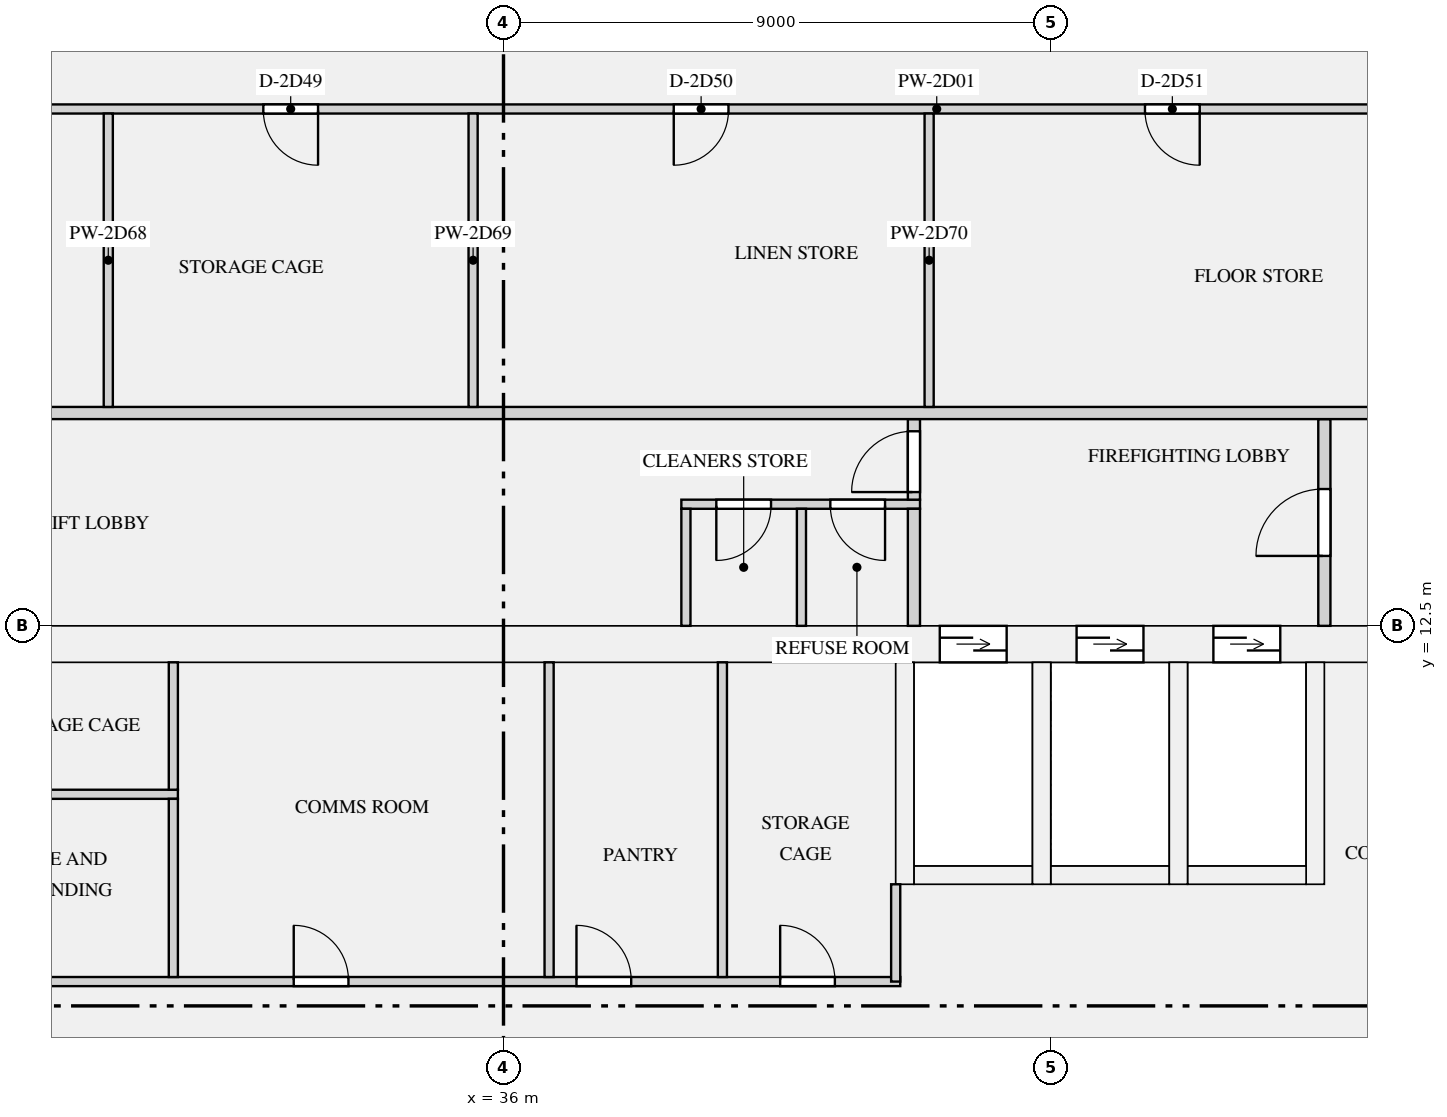
"""IFC4 building model, lengths in metres.
Left out: names, types, materials, properties, quantities, classifications, styles, units other than length and angle.
Written with IfcOpenShell. Run it as: python <this file> out.ifc"""

import sys

from ifc_helpers import new_model, si_unit, direction, frame, frame_2d, origin, place, context, subcontext, project, spatial, rectangle, extrude, element, fill, save


model = new_model("IFC4")
c1 = context("Model", 3, precision=1e-05, world=origin(), true_north=direction((0.0, 1.0)))
c2 = subcontext(c1, "Body", "Model", "MODEL_VIEW")
j1 = project(units=[si_unit("LENGTHUNIT", "METRE"), si_unit("PLANEANGLEUNIT", "RADIAN")], contexts=[c1])
p1 = place(None, origin())
s1 = spatial("IfcSite", under=j1, at=p1, CompositionType="ELEMENT")
p2 = place(p1, origin())
s2 = spatial("IfcBuilding", under=s1, at=p2, CompositionType="ELEMENT")
p3 = place(p2, frame((0.0, 0.0, 111.9)))
s3 = spatial("IfcBuildingStorey", under=s2, at=p3, CompositionType="ELEMENT", Elevation=111.9)
p4 = place(p3, frame((18.8, 12.2, 0.0), z_axis=(0.0, 0.0, 1.0), x_axis=(1.0, 0.0, 0.0)))
e1 = element("IfcWall", 1, at=p4, inside=s3, PredefinedType="SHEAR", context=c2, shape_type="SweptSolid", body=[
    extrude(rectangle(XDim=34.4, YDim=0.6, at=frame_2d((17.2, 0.0))), origin(), (0.0, 0.0, 1.0), 3.15),
])
p5 = place(p4, frame((24.375, 0.0, 0.0)))
e2 = element("IfcOpeningElement", 2, at=p5, cuts=e1, PredefinedType="OPENING", context=c2, shape_type="SweptSolid", body=[
    extrude(rectangle(XDim=1.1, YDim=2.1, at=frame_2d((0.55, 1.05))), frame((0.0, 0.31, 0.0), z_axis=(0.0, -1.0, 0.0), x_axis=(1.0, 0.0, 0.0)), (0.0, 0.0, 1.0), 0.62),
])
p6 = place(p4, frame((26.625, 0.0, 0.0)))
e3 = element("IfcOpeningElement", 3, at=p6, cuts=e1, PredefinedType="OPENING", context=c2, shape_type="SweptSolid", body=[
    extrude(rectangle(XDim=1.1, YDim=2.1, at=frame_2d((0.55, 1.05))), frame((0.0, 0.31, 0.0), z_axis=(0.0, -1.0, 0.0), x_axis=(1.0, 0.0, 0.0)), (0.0, 0.0, 1.0), 0.62),
])
p7 = place(p4, frame((28.875, 0.0, 0.0)))
e4 = element("IfcOpeningElement", 4, at=p7, cuts=e1, PredefinedType="OPENING", context=c2, shape_type="SweptSolid", body=[
    extrude(rectangle(XDim=1.1, YDim=2.1, at=frame_2d((0.55, 1.05))), frame((0.0, 0.31, 0.0), z_axis=(0.0, -1.0, 0.0), x_axis=(1.0, 0.0, 0.0)), (0.0, 0.0, 1.0), 0.62),
])
p8 = place(p4, frame((8.75, 0.0, 0.0)))
e5 = element("IfcOpeningElement", 5, at=p8, cuts=e1, PredefinedType="OPENING", context=c2, shape_type="SweptSolid", body=[
    extrude(rectangle(XDim=0.9, YDim=2.1, at=frame_2d((0.45, 1.05))), frame((0.0, 0.31, 0.0), z_axis=(0.0, -1.0, 0.0), x_axis=(1.0, 0.0, 0.0)), (0.0, 0.0, 1.0), 0.62),
])
p9 = place(p4, frame((1.35, 0.0, 0.0)))
e6 = element("IfcOpeningElement", 6, at=p9, cuts=e1, PredefinedType="OPENING", context=c2, shape_type="SweptSolid", body=[
    extrude(rectangle(XDim=1.2, YDim=2.1, at=frame_2d((0.6, 1.05))), frame((0.0, 0.31, 0.0), z_axis=(0.0, -1.0, 0.0), x_axis=(1.0, 0.0, 0.0)), (0.0, 0.0, 1.0), 0.62),
])
p10 = place(p4, frame((31.85, 0.0, 0.0)))
e7 = element("IfcOpeningElement", 7, at=p10, cuts=e1, PredefinedType="OPENING", context=c2, shape_type="SweptSolid", body=[
    extrude(rectangle(XDim=1.2, YDim=2.1, at=frame_2d((0.6, 1.05))), frame((0.0, 0.31, 0.0), z_axis=(0.0, -1.0, 0.0), x_axis=(1.0, 0.0, 0.0)), (0.0, 0.0, 1.0), 0.62),
])
p11 = place(p3, frame((42.75, 8.4, 0.0), z_axis=(0.0, 0.0, 1.0), x_axis=(1.0, 0.0, 0.0)))
e8 = element("IfcWall", 8, at=p11, inside=s3, PredefinedType="SHEAR", context=c2, shape_type="SweptSolid", body=[
    extrude(rectangle(XDim=1.95, YDim=0.3, at=frame_2d((0.975, 0.0))), origin(), (0.0, 0.0, 1.0), 3.15),
])
p12 = place(p3, frame((42.6, 8.25, 0.0), z_axis=(0.0, 0.0, 1.0), x_axis=(0.0, 1.0, 0.0)))
e9 = element("IfcWall", 9, at=p12, inside=s3, PredefinedType="SHEAR", context=c2, shape_type="SweptSolid", body=[
    extrude(rectangle(XDim=3.65, YDim=0.3, at=frame_2d((1.825, 0.0))), origin(), (0.0, 0.0, 1.0), 3.15),
])
p13 = place(p3, frame((45.0, 8.4, 0.0), z_axis=(0.0, 0.0, 1.0), x_axis=(1.0, 0.0, 0.0)))
e10 = element("IfcWall", 10, at=p13, inside=s3, PredefinedType="SHEAR", context=c2, shape_type="SweptSolid", body=[
    extrude(rectangle(XDim=1.95, YDim=0.3, at=frame_2d((0.975, 0.0))), origin(), (0.0, 0.0, 1.0), 3.15),
])
p14 = place(p3, frame((44.85, 8.25, 0.0), z_axis=(0.0, 0.0, 1.0), x_axis=(0.0, 1.0, 0.0)))
e11 = element("IfcWall", 11, at=p14, inside=s3, PredefinedType="SHEAR", context=c2, shape_type="SweptSolid", body=[
    extrude(rectangle(XDim=3.65, YDim=0.3, at=frame_2d((1.825, 0.0))), origin(), (0.0, 0.0, 1.0), 3.15),
])
p15 = place(p3, frame((47.25, 8.4, 0.0), z_axis=(0.0, 0.0, 1.0), x_axis=(1.0, 0.0, 0.0)))
e12 = element("IfcWall", 12, at=p15, inside=s3, PredefinedType="SHEAR", context=c2, shape_type="SweptSolid", body=[
    extrude(rectangle(XDim=1.95, YDim=0.3, at=frame_2d((0.975, 0.0))), origin(), (0.0, 0.0, 1.0), 3.15),
])
for number, where, z_axis, x_axis in (
    (13, (47.1, 8.25, 0.0), (0.0, 0.0, 1.0), (0.0, 1.0, 0.0)),
    (14, (49.35, 8.25, 0.0), (0.0, 0.0, 1.0), (0.0, 1.0, 0.0)),
):
    element("IfcWall", number, at=place(p3, frame(where, z_axis=z_axis, x_axis=x_axis)), inside=s3, PredefinedType="SHEAR", context=c2, shape_type="SweptSolid", body=[
        extrude(rectangle(XDim=3.65, YDim=0.3, at=frame_2d((1.825, 0.0))), origin(), (0.0, 0.0, 1.0), 3.15),
    ])
p16 = place(p3, frame((22.725, 6.65, 0.0), z_axis=(0.0, 0.0, 1.0), x_axis=(1.0, 0.0, 0.0)))
e15 = element("IfcWall", 15, at=p16, inside=s3, PredefinedType="PARTITIONING", context=c2, shape_type="SweptSolid", body=[
    extrude(rectangle(XDim=19.8, YDim=0.15, at=frame_2d((9.9, 0.0))), origin(), (0.0, 0.0, 1.0), 2.83),
])
p17 = place(p16, frame((0.825, 0.0, 0.0)))
e16 = element("IfcOpeningElement", 16, at=p17, cuts=e15, PredefinedType="OPENING", context=c2, shape_type="SweptSolid", body=[
    extrude(rectangle(XDim=0.9, YDim=2.1, at=frame_2d((0.45, 1.05))), frame((0.0, 0.085, 0.0), z_axis=(0.0, -1.0, 0.0), x_axis=(1.0, 0.0, 0.0)), (0.0, 0.0, 1.0), 0.17),
])
p18 = place(p16, frame((4.825, 0.0, 0.0)))
e17 = element("IfcOpeningElement", 17, at=p18, cuts=e15, PredefinedType="OPENING", context=c2, shape_type="SweptSolid", body=[
    extrude(rectangle(XDim=0.9, YDim=2.1, at=frame_2d((0.45, 1.05))), frame((0.0, 0.085, 0.0), z_axis=(0.0, -1.0, 0.0), x_axis=(1.0, 0.0, 0.0)), (0.0, 0.0, 1.0), 0.17),
])
p19 = place(p16, frame((9.825, 0.0, 0.0)))
e18 = element("IfcOpeningElement", 18, at=p19, cuts=e15, PredefinedType="OPENING", context=c2, shape_type="SweptSolid", body=[
    extrude(rectangle(XDim=0.9, YDim=2.1, at=frame_2d((0.45, 1.05))), frame((0.0, 0.085, 0.0), z_axis=(0.0, -1.0, 0.0), x_axis=(1.0, 0.0, 0.0)), (0.0, 0.0, 1.0), 0.17),
])
p20 = place(p16, frame((14.475, 0.0, 0.0)))
e19 = element("IfcOpeningElement", 19, at=p20, cuts=e15, PredefinedType="OPENING", context=c2, shape_type="SweptSolid", body=[
    extrude(rectangle(XDim=0.9, YDim=2.1, at=frame_2d((0.45, 1.05))), frame((0.0, 0.085, 0.0), z_axis=(0.0, -1.0, 0.0), x_axis=(1.0, 0.0, 0.0)), (0.0, 0.0, 1.0), 0.17),
])
p21 = place(p16, frame((17.825, 0.0, 0.0)))
e20 = element("IfcOpeningElement", 20, at=p21, cuts=e15, PredefinedType="OPENING", context=c2, shape_type="SweptSolid", body=[
    extrude(rectangle(XDim=0.9, YDim=2.1, at=frame_2d((0.45, 1.05))), frame((0.0, 0.085, 0.0), z_axis=(0.0, -1.0, 0.0), x_axis=(1.0, 0.0, 0.0)), (0.0, 0.0, 1.0), 0.17),
])
p22 = place(p3, frame((25.855, 9.73, 0.0), z_axis=(0.0, 0.0, 1.0), x_axis=(1.0, 0.0, 0.0)))
e21 = element("IfcWall", 21, at=p22, inside=s3, PredefinedType="PARTITIONING", context=c2, shape_type="SweptSolid", body=[
    extrude(rectangle(XDim=4.79, YDim=0.15, at=frame_2d((2.395, 0.0))), origin(), (0.0, 0.0, 1.0), 2.83),
])
p23 = place(p3, frame((38.925, 14.5, 0.0), z_axis=(0.0, 0.0, 1.0), x_axis=(1.0, 0.0, 0.0)))
e22 = element("IfcWall", 22, at=p23, inside=s3, PredefinedType="PARTITIONING", context=c2, shape_type="SweptSolid", body=[
    extrude(rectangle(XDim=3.925, YDim=0.15, at=frame_2d((1.962, 0.0))), origin(), (0.0, 0.0, 1.0), 2.83),
])
p24 = place(p23, frame((0.575, 0.0, 0.0)))
e23 = element("IfcOpeningElement", 23, at=p24, cuts=e22, PredefinedType="OPENING", context=c2, shape_type="SweptSolid", body=[
    extrude(rectangle(XDim=0.9, YDim=2.1, at=frame_2d((0.45, 1.05))), frame((0.0, 0.085, 0.0), z_axis=(0.0, -1.0, 0.0), x_axis=(1.0, 0.0, 0.0)), (0.0, 0.0, 1.0), 0.17),
])
p25 = place(p23, frame((2.45, 0.0, 0.0)))
e24 = element("IfcOpeningElement", 24, at=p25, cuts=e22, PredefinedType="OPENING", context=c2, shape_type="SweptSolid", body=[
    extrude(rectangle(XDim=0.9, YDim=2.1, at=frame_2d((0.45, 1.05))), frame((0.0, 0.085, 0.0), z_axis=(0.0, -1.0, 0.0), x_axis=(1.0, 0.0, 0.0)), (0.0, 0.0, 1.0), 0.17),
])
p26 = place(p3, frame((42.45, 6.65, 0.0), z_axis=(0.0, 0.0, 1.0), x_axis=(0.0, 1.0, 0.0)))
e25 = element("IfcWall", 25, at=p26, inside=s3, PredefinedType="PARTITIONING", context=c2, shape_type="SweptSolid", body=[
    extrude(rectangle(XDim=1.6, YDim=0.15, at=frame_2d((0.8, 0.0))), origin(), (0.0, 0.0, 1.0), 2.83),
])
p27 = place(p3, frame((30.57, 6.725, 0.0), z_axis=(0.0, 0.0, 1.0), x_axis=(0.0, 1.0, 0.0)))
e26 = element("IfcWall", 26, at=p27, inside=s3, PredefinedType="PARTITIONING", context=c2, shape_type="SweptSolid", body=[
    extrude(rectangle(XDim=2.93, YDim=0.15, at=frame_2d((1.465, 0.0))), origin(), (0.0, 0.0, 1.0), 2.83),
])
for number, where, z_axis, x_axis in (
    (27, (36.75, 6.725, 0.0), (0.0, 0.0, 1.0), (0.0, 1.0, 0.0)),
    (28, (39.6, 6.725, 0.0), (0.0, 0.0, 1.0), (0.0, 1.0, 0.0)),
):
    element("IfcWall", number, at=place(p3, frame(where, z_axis=z_axis, x_axis=x_axis)), inside=s3, PredefinedType="PARTITIONING", context=c2, shape_type="SweptSolid", body=[
        extrude(rectangle(XDim=5.175, YDim=0.15, at=frame_2d((2.587, 0.0))), origin(), (0.0, 0.0, 1.0), 2.83),
    ])
p28 = place(p3, frame((30.57, 9.805, 0.0), z_axis=(0.0, 0.0, 1.0), x_axis=(0.0, 1.0, 0.0)))
e29 = element("IfcWall", 29, at=p28, inside=s3, PredefinedType="PARTITIONING", context=c2, shape_type="SweptSolid", body=[
    extrude(rectangle(XDim=2.095, YDim=0.15, at=frame_2d((1.047, 0.0))), origin(), (0.0, 0.0, 1.0), 2.83),
])
for number, where, z_axis, x_axis in (
    (30, (39.0, 12.5, 0.0), (0.0, 0.0, 1.0), (0.0, 1.0, 0.0)),
    (31, (40.9, 12.5, 0.0), (0.0, 0.0, 1.0), (0.0, 1.0, 0.0)),
):
    element("IfcWall", number, at=place(p3, frame(where, z_axis=z_axis, x_axis=x_axis)), inside=s3, PredefinedType="PARTITIONING", context=c2, shape_type="SweptSolid", body=[
        extrude(rectangle(XDim=1.925, YDim=0.15, at=frame_2d((0.962, 0.0))), origin(), (0.0, 0.0, 1.0), 2.83),
    ])
p29 = place(p3, frame((42.75, 12.5, 0.0), z_axis=(0.0, 0.0, 1.0), x_axis=(0.0, 1.0, 0.0)))
e32 = element("IfcWall", 32, at=p29, inside=s3, PredefinedType="PARTITIONING", context=c2, shape_type="SweptSolid", body=[
    extrude(rectangle(XDim=1.925, YDim=0.2, at=frame_2d((0.962, 0.0))), origin(), (0.0, 0.0, 1.0), 2.83),
])
p30 = place(p3, frame((49.5, 12.5, 0.0), z_axis=(0.0, 0.0, 1.0), x_axis=(0.0, 1.0, 0.0)))
e33 = element("IfcWall", 33, at=p30, inside=s3, PredefinedType="PARTITIONING", context=c2, shape_type="SweptSolid", body=[
    extrude(rectangle(XDim=3.4, YDim=0.2, at=frame_2d((1.7, 0.0))), origin(), (0.0, 0.0, 1.0), 2.83),
])
p31 = place(p30, frame((1.15, 0.0, 0.0)))
e34 = element("IfcOpeningElement", 34, at=p31, cuts=e33, PredefinedType="OPENING", context=c2, shape_type="SweptSolid", body=[
    extrude(rectangle(XDim=1.1, YDim=2.1, at=frame_2d((0.55, 1.05))), frame((0.0, 0.11, 0.0), z_axis=(0.0, -1.0, 0.0), x_axis=(1.0, 0.0, 0.0)), (0.0, 0.0, 1.0), 0.22),
])
p32 = place(p3, frame((42.75, 14.575, 0.0), z_axis=(0.0, 0.0, 1.0), x_axis=(0.0, 1.0, 0.0)))
e35 = element("IfcWall", 35, at=p32, inside=s3, PredefinedType="PARTITIONING", context=c2, shape_type="SweptSolid", body=[
    extrude(rectangle(XDim=1.325, YDim=0.2, at=frame_2d((0.663, 0.0))), origin(), (0.0, 0.0, 1.0), 2.83),
])
p33 = place(p32, frame((0.125, 0.0, 0.0)))
e36 = element("IfcOpeningElement", 36, at=p33, cuts=e35, PredefinedType="OPENING", context=c2, shape_type="SweptSolid", body=[
    extrude(rectangle(XDim=1.0, YDim=2.1, at=frame_2d((0.5, 1.05))), frame((0.0, 0.11, 0.0), z_axis=(0.0, -1.0, 0.0), x_axis=(1.0, 0.0, 0.0)), (0.0, 0.0, 1.0), 0.22),
])
p34 = place(p3, frame((20.925, 21.0, 0.0), z_axis=(0.0, 0.0, 1.0), x_axis=(1.0, 0.0, 0.0)))
e37 = element("IfcWall", 37, at=p34, inside=s3, PredefinedType="PARTITIONING", context=c2, shape_type="SweptSolid", body=[
    extrude(rectangle(XDim=30.15, YDim=0.15, at=frame_2d((15.075, 0.0))), origin(), (0.0, 0.0, 1.0), 2.83),
])
p35 = place(p34, frame((3.875, 0.0, 0.0)))
e38 = element("IfcOpeningElement", 38, at=p35, cuts=e37, PredefinedType="OPENING", context=c2, shape_type="SweptSolid", body=[
    extrude(rectangle(XDim=0.9, YDim=2.1, at=frame_2d((0.45, 1.05))), frame((0.0, 0.085, 0.0), z_axis=(0.0, -1.0, 0.0), x_axis=(1.0, 0.0, 0.0)), (0.0, 0.0, 1.0), 0.17),
])
p36 = place(p34, frame((11.125, 0.0, 0.0)))
e39 = element("IfcOpeningElement", 39, at=p36, cuts=e37, PredefinedType="OPENING", context=c2, shape_type="SweptSolid", body=[
    extrude(rectangle(XDim=0.9, YDim=2.1, at=frame_2d((0.45, 1.05))), frame((0.0, 0.085, 0.0), z_axis=(0.0, -1.0, 0.0), x_axis=(1.0, 0.0, 0.0)), (0.0, 0.0, 1.0), 0.17),
])
p37 = place(p34, frame((17.875, 0.0, 0.0)))
e40 = element("IfcOpeningElement", 40, at=p37, cuts=e37, PredefinedType="OPENING", context=c2, shape_type="SweptSolid", body=[
    extrude(rectangle(XDim=0.9, YDim=2.1, at=frame_2d((0.45, 1.05))), frame((0.0, 0.085, 0.0), z_axis=(0.0, -1.0, 0.0), x_axis=(1.0, 0.0, 0.0)), (0.0, 0.0, 1.0), 0.17),
])
p38 = place(p34, frame((25.625, 0.0, 0.0)))
e41 = element("IfcOpeningElement", 41, at=p38, cuts=e37, PredefinedType="OPENING", context=c2, shape_type="SweptSolid", body=[
    extrude(rectangle(XDim=0.9, YDim=2.1, at=frame_2d((0.45, 1.05))), frame((0.0, 0.085, 0.0), z_axis=(0.0, -1.0, 0.0), x_axis=(1.0, 0.0, 0.0)), (0.0, 0.0, 1.0), 0.17),
])
p39 = place(p3, frame((17.9, 16.0, 0.0), z_axis=(0.0, 0.0, 1.0), x_axis=(1.0, 0.0, 0.0)))
e42 = element("IfcWall", 42, at=p39, inside=s3, PredefinedType="PARTITIONING", context=c2, shape_type="SweptSolid", body=[
    extrude(rectangle(XDim=36.2, YDim=0.2, at=frame_2d((18.1, 0.0))), origin(), (0.0, 0.0, 1.0), 2.83),
])
p40 = place(p39, frame((0.9, 0.0, 0.0)))
e43 = element("IfcOpeningElement", 43, at=p40, cuts=e42, PredefinedType="OPENING", context=c2, shape_type="SweptSolid", body=[
    extrude(rectangle(XDim=1.4, YDim=2.1, at=frame_2d((0.7, 1.05))), frame((0.0, 0.11, 0.0), z_axis=(0.0, -1.0, 0.0), x_axis=(1.0, 0.0, 0.0)), (0.0, 0.0, 1.0), 0.22),
])
p41 = place(p39, frame((33.9, 0.0, 0.0)))
e44 = element("IfcOpeningElement", 44, at=p41, cuts=e42, PredefinedType="OPENING", context=c2, shape_type="SweptSolid", body=[
    extrude(rectangle(XDim=1.4, YDim=2.1, at=frame_2d((0.7, 1.05))), frame((0.0, 0.11, 0.0), z_axis=(0.0, -1.0, 0.0), x_axis=(1.0, 0.0, 0.0)), (0.0, 0.0, 1.0), 0.22),
])
for number, where, z_axis, x_axis in (
    (45, (29.5, 16.1, 0.0), (0.0, 0.0, 1.0), (0.0, 1.0, 0.0)),
    (46, (35.5, 16.1, 0.0), (0.0, 0.0, 1.0), (0.0, 1.0, 0.0)),
    (47, (43.0, 16.1, 0.0), (0.0, 0.0, 1.0), (0.0, 1.0, 0.0)),
):
    element("IfcWall", number, at=place(p3, frame(where, z_axis=z_axis, x_axis=x_axis)), inside=s3, PredefinedType="PARTITIONING", context=c2, shape_type="SweptSolid", body=[
        extrude(rectangle(XDim=4.825, YDim=0.15, at=frame_2d((2.413, 0.0))), origin(), (0.0, 0.0, 1.0), 2.83),
    ])
p42 = place(p5, origin())
e48 = element("IfcDoor", 48, at=p42, inside=s3, OperationType="DOUBLE_DOOR_SLIDING", PredefinedType="DOOR", context=c2, shape_type="SweptSolid", body=[
    extrude(rectangle(XDim=1.1, YDim=2.1, at=frame_2d((0.55, 1.05))), frame((0.0, 0.025, 0.0), z_axis=(0.0, -1.0, 0.0), x_axis=(1.0, 0.0, 0.0)), (0.0, 0.0, 1.0), 0.05),
])
fill(e2, e48)
p43 = place(p6, origin())
e49 = element("IfcDoor", 49, at=p43, inside=s3, OperationType="DOUBLE_DOOR_SLIDING", PredefinedType="DOOR", context=c2, shape_type="SweptSolid", body=[
    extrude(rectangle(XDim=1.1, YDim=2.1, at=frame_2d((0.55, 1.05))), frame((0.0, 0.025, 0.0), z_axis=(0.0, -1.0, 0.0), x_axis=(1.0, 0.0, 0.0)), (0.0, 0.0, 1.0), 0.05),
])
fill(e3, e49)
p44 = place(p7, origin())
e50 = element("IfcDoor", 50, at=p44, inside=s3, OperationType="DOUBLE_DOOR_SLIDING", PredefinedType="DOOR", context=c2, shape_type="SweptSolid", body=[
    extrude(rectangle(XDim=1.1, YDim=2.1, at=frame_2d((0.55, 1.05))), frame((0.0, 0.025, 0.0), z_axis=(0.0, -1.0, 0.0), x_axis=(1.0, 0.0, 0.0)), (0.0, 0.0, 1.0), 0.05),
])
fill(e4, e50)
p45 = place(p24, frame((0.9, 0.0, 0.0), z_axis=(0.0, 0.0, 1.0), x_axis=(-1.0, 0.0, 0.0)))
e51 = element("IfcDoor", 51, at=p45, inside=s3, OperationType="SINGLE_SWING_RIGHT", PredefinedType="DOOR", context=c2, shape_type="SweptSolid", body=[
    extrude(rectangle(XDim=0.9, YDim=2.1, at=frame_2d((0.45, 1.05))), frame((0.0, 0.025, 0.0), z_axis=(0.0, -1.0, 0.0), x_axis=(1.0, 0.0, 0.0)), (0.0, 0.0, 1.0), 0.05),
])
fill(e23, e51)
p46 = place(p25, frame((0.9, 0.0, 0.0), z_axis=(0.0, 0.0, 1.0), x_axis=(-1.0, 0.0, 0.0)))
e52 = element("IfcDoor", 52, at=p46, inside=s3, OperationType="SINGLE_SWING_LEFT", PredefinedType="DOOR", context=c2, shape_type="SweptSolid", body=[
    extrude(rectangle(XDim=0.9, YDim=2.1, at=frame_2d((0.45, 1.05))), frame((0.0, 0.025, 0.0), z_axis=(0.0, -1.0, 0.0), x_axis=(1.0, 0.0, 0.0)), (0.0, 0.0, 1.0), 0.05),
])
fill(e24, e52)
p47 = place(p19, origin())
e53 = element("IfcDoor", 53, at=p47, inside=s3, OperationType="SINGLE_SWING_LEFT", PredefinedType="DOOR", context=c2, shape_type="SweptSolid", body=[
    extrude(rectangle(XDim=0.9, YDim=2.1, at=frame_2d((0.45, 1.05))), frame((0.0, 0.025, 0.0), z_axis=(0.0, -1.0, 0.0), x_axis=(1.0, 0.0, 0.0)), (0.0, 0.0, 1.0), 0.05),
])
fill(e18, e53)
p48 = place(p20, origin())
e54 = element("IfcDoor", 54, at=p48, inside=s3, OperationType="SINGLE_SWING_LEFT", PredefinedType="DOOR", context=c2, shape_type="SweptSolid", body=[
    extrude(rectangle(XDim=0.9, YDim=2.1, at=frame_2d((0.45, 1.05))), frame((0.0, 0.025, 0.0), z_axis=(0.0, -1.0, 0.0), x_axis=(1.0, 0.0, 0.0)), (0.0, 0.0, 1.0), 0.05),
])
fill(e19, e54)
p49 = place(p21, origin())
e55 = element("IfcDoor", 55, at=p49, inside=s3, OperationType="SINGLE_SWING_LEFT", PredefinedType="DOOR", context=c2, shape_type="SweptSolid", body=[
    extrude(rectangle(XDim=0.9, YDim=2.1, at=frame_2d((0.45, 1.05))), frame((0.0, 0.025, 0.0), z_axis=(0.0, -1.0, 0.0), x_axis=(1.0, 0.0, 0.0)), (0.0, 0.0, 1.0), 0.05),
])
fill(e20, e55)
p50 = place(p33, origin())
e56 = element("IfcDoor", 56, at=p50, inside=s3, OperationType="SINGLE_SWING_LEFT", PredefinedType="DOOR", context=c2, shape_type="SweptSolid", body=[
    extrude(rectangle(XDim=1.0, YDim=2.1, at=frame_2d((0.5, 1.05))), frame((0.0, 0.025, 0.0), z_axis=(0.0, -1.0, 0.0), x_axis=(1.0, 0.0, 0.0)), (0.0, 0.0, 1.0), 0.05),
])
fill(e36, e56)
p51 = place(p31, origin())
e57 = element("IfcDoor", 57, at=p51, inside=s3, OperationType="SINGLE_SWING_LEFT", PredefinedType="DOOR", context=c2, shape_type="SweptSolid", body=[
    extrude(rectangle(XDim=1.1, YDim=2.1, at=frame_2d((0.55, 1.05))), frame((0.0, 0.025, 0.0), z_axis=(0.0, -1.0, 0.0), x_axis=(1.0, 0.0, 0.0)), (0.0, 0.0, 1.0), 0.05),
])
fill(e34, e57)
p52 = place(p36, frame((0.9, 0.0, 0.0), z_axis=(0.0, 0.0, 1.0), x_axis=(-1.0, 0.0, 0.0)))
e58 = element("IfcDoor", 58, at=p52, inside=s3, OperationType="SINGLE_SWING_LEFT", PredefinedType="DOOR", context=c2, shape_type="SweptSolid", body=[
    extrude(rectangle(XDim=0.9, YDim=2.1, at=frame_2d((0.45, 1.05))), frame((0.0, 0.025, 0.0), z_axis=(0.0, -1.0, 0.0), x_axis=(1.0, 0.0, 0.0)), (0.0, 0.0, 1.0), 0.05),
])
fill(e39, e58)
p53 = place(p37, frame((0.9, 0.0, 0.0), z_axis=(0.0, 0.0, 1.0), x_axis=(-1.0, 0.0, 0.0)))
e59 = element("IfcDoor", 59, at=p53, inside=s3, OperationType="SINGLE_SWING_RIGHT", PredefinedType="DOOR", context=c2, shape_type="SweptSolid", body=[
    extrude(rectangle(XDim=0.9, YDim=2.1, at=frame_2d((0.45, 1.05))), frame((0.0, 0.025, 0.0), z_axis=(0.0, -1.0, 0.0), x_axis=(1.0, 0.0, 0.0)), (0.0, 0.0, 1.0), 0.05),
])
fill(e40, e59)
p54 = place(p38, frame((0.9, 0.0, 0.0), z_axis=(0.0, 0.0, 1.0), x_axis=(-1.0, 0.0, 0.0)))
e60 = element("IfcDoor", 60, at=p54, inside=s3, OperationType="SINGLE_SWING_LEFT", PredefinedType="DOOR", context=c2, shape_type="SweptSolid", body=[
    extrude(rectangle(XDim=0.9, YDim=2.1, at=frame_2d((0.45, 1.05))), frame((0.0, 0.025, 0.0), z_axis=(0.0, -1.0, 0.0), x_axis=(1.0, 0.0, 0.0)), (0.0, 0.0, 1.0), 0.05),
])
fill(e41, e60)
save(model, sys.argv[1])
